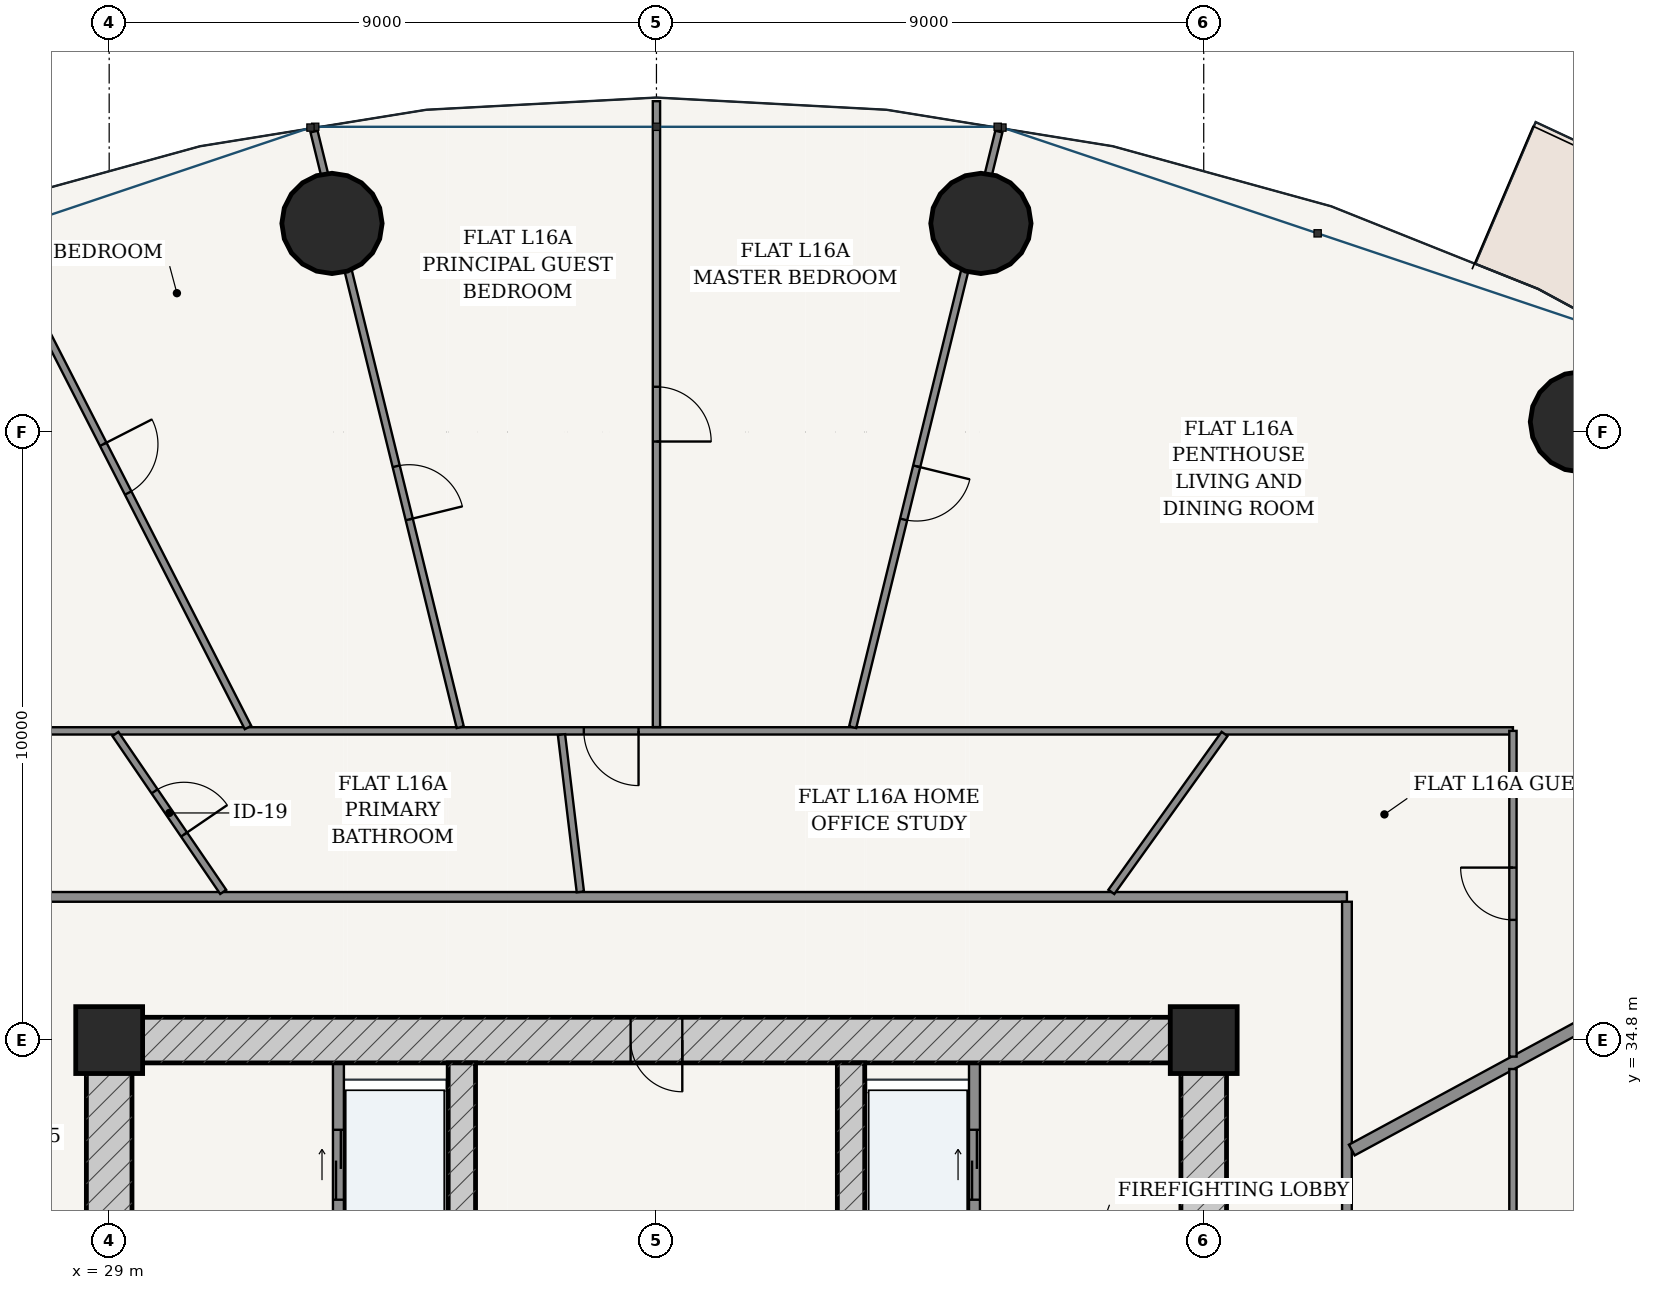
"""IFC4 building model, lengths in metres.
Left out: names, types, materials, properties, quantities, classifications, styles, units other than length and angle.
Written with IfcOpenShell. Run it as: python <this file> out.ifc"""

import sys

from ifc_helpers import new_model, si_unit, direction, frame, frame_2d, origin, origin_2d, place, context, subcontext, project, spatial, rectangle, hollow_circle, extrude, source, transform, mapped, element, fill, save


model = new_model("IFC4")
c1 = context("Model", 3, precision=1e-05, world=origin(), true_north=direction((-0.2419218956, 0.970295726276)))
c2 = subcontext(c1, "Body", "Model", "MODEL_VIEW")
j1 = project(units=[si_unit("LENGTHUNIT", "METRE"), si_unit("PLANEANGLEUNIT", "RADIAN")], contexts=[c1])
p1 = place(None, origin())
s1 = spatial("IfcSite", under=j1, at=p1, CompositionType="ELEMENT")
p2 = place(p1, origin())
s2 = spatial("IfcBuilding", under=s1, at=p2, CompositionType="ELEMENT")
p3 = place(p2, frame((0.0, 0.0, 63.6)))
s3 = spatial("IfcBuildingStorey", under=s2, at=p3, CompositionType="ELEMENT", Elevation=63.6)
for number, where, z_axis, x_axis in (
    (1, (47.0, 34.8, 0.0), (0.0, 0.0, 1.0), (1.0, 0.0, 0.0)),
    (2, (29.0, 34.8, 0.0), (0.0, 0.0, 1.0), (1.0, 0.0, 0.0)),
):
    element("IfcColumn", number, at=place(p3, frame(where, z_axis=z_axis, x_axis=x_axis)), inside=s3, PredefinedType="COLUMN", context=c2, shape_type="SweptSolid", body=[
        extrude(rectangle(XDim=1.1, YDim=1.1, at=origin_2d()), origin(), (0.0, 0.0, 1.0), 3.6),
    ])
p4 = place(p3, frame((28.625, 34.8, 0.0), z_axis=(0.0, 0.0, 1.0), x_axis=(1.0, 0.0, 0.0)))
e3 = element("IfcWall", 3, at=p4, inside=s3, PredefinedType="SHEAR", context=c2, shape_type="SweptSolid", body=[
    extrude(rectangle(XDim=18.75, YDim=0.75, at=frame_2d((9.375, 0.0))), origin(), (0.0, 0.0, 1.0), 3.32),
])
p5 = place(p4, frame((8.95, 0.0, 0.0)))
e4 = element("IfcOpeningElement", 4, at=p5, cuts=e3, PredefinedType="OPENING", context=c2, shape_type="SweptSolid", body=[
    extrude(rectangle(XDim=0.85, YDim=2.1, at=frame_2d((0.425, 1.05))), frame((0.0, 0.385, 0.0), z_axis=(0.0, -1.0, 0.0), x_axis=(1.0, 0.0, 0.0)), (0.0, 0.0, 1.0), 0.77),
])
p6 = place(p3, frame((29.0, 19.175, 0.0), z_axis=(0.0, 0.0, 1.0), x_axis=(0.0, 1.0, 0.0)))
e5 = element("IfcWall", 5, at=p6, inside=s3, PredefinedType="SHEAR", context=c2, shape_type="SweptSolid", body=[
    extrude(rectangle(XDim=15.25, YDim=0.75, at=frame_2d((7.625, 0.0))), origin(), (0.0, 0.0, 1.0), 3.32),
])
p7 = place(p6, frame((9.875, 0.0, 0.0)))
e6 = element("IfcOpeningElement", 6, at=p7, cuts=e5, PredefinedType="OPENING", context=c2, shape_type="SweptSolid", body=[
    extrude(rectangle(XDim=1.5, YDim=2.2, at=frame_2d((0.75, 1.1))), frame((0.0, 0.385, 0.0), z_axis=(0.0, -1.0, 0.0), x_axis=(1.0, 0.0, 0.0)), (0.0, 0.0, 1.0), 0.77),
])
p8 = place(p3, frame((47.0, 19.175, 0.0), z_axis=(0.0, 0.0, 1.0), x_axis=(0.0, 1.0, 0.0)))
e7 = element("IfcWall", 7, at=p8, inside=s3, PredefinedType="SHEAR", context=c2, shape_type="SweptSolid", body=[
    extrude(rectangle(XDim=15.25, YDim=0.75, at=frame_2d((7.625, 0.0))), origin(), (0.0, 0.0, 1.0), 3.32),
])
p9 = place(p8, frame((9.875, 0.0, 0.0)))
e8 = element("IfcOpeningElement", 8, at=p9, cuts=e7, PredefinedType="OPENING", context=c2, shape_type="SweptSolid", body=[
    extrude(rectangle(XDim=1.5, YDim=2.2, at=frame_2d((0.75, 1.1))), frame((0.0, 0.385, 0.0), z_axis=(0.0, -1.0, 0.0), x_axis=(1.0, 0.0, 0.0)), (0.0, 0.0, 1.0), 0.77),
])
p10 = place(p3, frame((34.8, 19.175, 0.0), z_axis=(0.0, 0.0, 1.0), x_axis=(0.0, 1.0, 0.0)))
e9 = element("IfcWall", 9, at=p10, inside=s3, PredefinedType="SHEAR", context=c2, shape_type="SweptSolid", body=[
    extrude(rectangle(XDim=15.25, YDim=0.45, at=frame_2d((7.625, 0.0))), origin(), (0.0, 0.0, 1.0), 3.32),
])
p11 = place(p10, frame((7.8, 0.0, 0.0)))
e10 = element("IfcOpeningElement", 10, at=p11, cuts=e9, PredefinedType="OPENING", context=c2, shape_type="SweptSolid", body=[
    extrude(rectangle(XDim=1.05, YDim=2.15, at=frame_2d((0.525, 1.075))), frame((0.0, 0.235, 0.0), z_axis=(0.0, -1.0, 0.0), x_axis=(1.0, 0.0, 0.0)), (0.0, 0.0, 1.0), 0.47),
])
p12 = place(p3, frame((41.2, 19.175, 0.0), z_axis=(0.0, 0.0, 1.0), x_axis=(0.0, 1.0, 0.0)))
e11 = element("IfcWall", 11, at=p12, inside=s3, PredefinedType="SHEAR", context=c2, shape_type="SweptSolid", body=[
    extrude(rectangle(XDim=15.25, YDim=0.45, at=frame_2d((7.625, 0.0))), origin(), (0.0, 0.0, 1.0), 3.32),
])
p13 = place(p12, frame((7.8, 0.0, 0.0)))
e12 = element("IfcOpeningElement", 12, at=p13, cuts=e11, PredefinedType="OPENING", context=c2, shape_type="SweptSolid", body=[
    extrude(rectangle(XDim=1.05, YDim=2.15, at=frame_2d((0.525, 1.075))), frame((0.0, 0.235, 0.0), z_axis=(0.0, -1.0, 0.0), x_axis=(1.0, 0.0, 0.0)), (0.0, 0.0, 1.0), 0.47),
])
for number, where, z_axis, x_axis in (
    (13, (53.195, 44.968, 0.0), (0.0, 0.0, 1.0), (1.0, 0.0, 0.0)),
    (14, (43.336, 48.23, 0.0), (0.0, 0.0, 1.0), (1.0, 0.0, 0.0)),
    (15, (32.664, 48.23, 0.0), (0.0, 0.0, 1.0), (1.0, 0.0, 0.0)),
):
    element("IfcColumn", number, at=place(p3, frame(where, z_axis=z_axis, x_axis=x_axis)), inside=s3, PredefinedType="COLUMN", context=c2, shape_type="SweptSolid", body=[
        extrude(hollow_circle(Radius=0.825, WallThickness=0.05, at=origin_2d()), origin(), (0.0, 0.0, 1.0), 3.6),
    ])
p14 = place(p3, frame((32.77, 28.52, 0.0), z_axis=(0.0, 0.0, 1.0), x_axis=(0.0, 1.0, 0.0)))
e16 = element("IfcWall", 16, at=p14, inside=s3, PredefinedType="PARTITIONING", context=c2, shape_type="SweptSolid", body=[
    extrude(rectangle(XDim=5.905, YDim=0.18, at=frame_2d((2.953, 0.0))), origin(), (0.0, 0.0, 1.0), 3.32),
])
p15 = place(p14, frame((3.655, 0.0, 0.0)))
e17 = element("IfcOpeningElement", 17, at=p15, cuts=e16, PredefinedType="OPENING", context=c2, shape_type="SweptSolid", body=[
    extrude(rectangle(XDim=1.15, YDim=2.2, at=frame_2d((0.575, 1.1))), frame((0.0, 0.1, 0.0), z_axis=(0.0, -1.0, 0.0), x_axis=(1.0, 0.0, 0.0)), (0.0, 0.0, 1.0), 0.2),
])
p16 = place(p14, frame((0.73, 0.0, 0.0)))
e18 = element("IfcOpeningElement", 18, at=p16, cuts=e16, PredefinedType="OPENING", context=c2, shape_type="SweptSolid", body=[
    extrude(rectangle(XDim=1.2, YDim=2.25, at=frame_2d((0.6, 1.125))), frame((0.0, 0.1, 0.0), z_axis=(0.0, -1.0, 0.0), x_axis=(1.0, 0.0, 0.0)), (0.0, 0.0, 1.0), 0.2),
])
p17 = place(p3, frame((43.23, 28.52, 0.0), z_axis=(0.0, 0.0, 1.0), x_axis=(0.0, 1.0, 0.0)))
e19 = element("IfcWall", 19, at=p17, inside=s3, PredefinedType="PARTITIONING", context=c2, shape_type="SweptSolid", body=[
    extrude(rectangle(XDim=5.905, YDim=0.18, at=frame_2d((2.953, 0.0))), origin(), (0.0, 0.0, 1.0), 3.32),
])
p18 = place(p17, frame((0.905, 0.0, 0.0)))
e20 = element("IfcOpeningElement", 20, at=p18, cuts=e19, PredefinedType="OPENING", context=c2, shape_type="SweptSolid", body=[
    extrude(rectangle(XDim=0.85, YDim=2.1, at=frame_2d((0.425, 1.05))), frame((0.0, 0.1, 0.0), z_axis=(0.0, -1.0, 0.0), x_axis=(1.0, 0.0, 0.0)), (0.0, 0.0, 1.0), 0.2),
])
p19 = place(p17, frame((3.655, 0.0, 0.0)))
e21 = element("IfcOpeningElement", 21, at=p19, cuts=e19, PredefinedType="OPENING", context=c2, shape_type="SweptSolid", body=[
    extrude(rectangle(XDim=1.15, YDim=2.2, at=frame_2d((0.575, 1.1))), frame((0.0, 0.1, 0.0), z_axis=(0.0, -1.0, 0.0), x_axis=(1.0, 0.0, 0.0)), (0.0, 0.0, 1.0), 0.2),
])
p20 = place(p3, frame((26.645, 37.155, 0.0), z_axis=(0.0, 0.0, 1.0), x_axis=(1.0, 0.0, 0.0)))
e22 = element("IfcWall", 22, at=p20, inside=s3, PredefinedType="PARTITIONING", context=c2, shape_type="SweptSolid", body=[
    extrude(rectangle(XDim=22.71, YDim=0.16, at=frame_2d((11.355, 0.0))), origin(), (0.0, 0.0, 1.0), 2.688),
])
p21 = place(p3, frame((49.355, 16.525, 0.0), z_axis=(0.0, 0.0, 1.0), x_axis=(0.0, 1.0, 0.0)))
e23 = element("IfcWall", 23, at=p21, inside=s3, PredefinedType="PARTITIONING", context=c2, shape_type="SweptSolid", body=[
    extrude(rectangle(XDim=20.55, YDim=0.16, at=frame_2d((10.275, 0.0))), origin(), (0.0, 0.0, 1.0), 2.688),
])
p22 = place(p21, frame((2.733, 0.0, 0.0)))
e24 = element("IfcOpeningElement", 24, at=p22, cuts=e23, PredefinedType="OPENING", context=c2, shape_type="SweptSolid", body=[
    extrude(rectangle(XDim=0.98, YDim=2.2, at=frame_2d((0.49, 1.1))), frame((0.0, 0.09, 0.0), z_axis=(0.0, -1.0, 0.0), x_axis=(1.0, 0.0, 0.0)), (0.0, 0.0, 1.0), 0.18),
])
p23 = place(p3, frame((49.435, 32.991, 0.0), z_axis=(0.0, 0.0, 1.0), x_axis=(0.879369737803, 0.476139542819, 0.0)))
e25 = element("IfcWall", 25, at=p23, inside=s3, PredefinedType="PARTITIONING", context=c2, shape_type="SweptSolid", body=[
    extrude(rectangle(XDim=14.295, YDim=0.2, at=frame_2d((7.147, 0.0))), origin(), (0.0, 0.0, 1.0), 2.688),
])
p24 = place(p3, frame((23.915, 39.885, 0.0), z_axis=(0.0, 0.0, 1.0), x_axis=(1.0, 0.0, 0.0)))
e26 = element("IfcWall", 26, at=p24, inside=s3, PredefinedType="PARTITIONING", context=c2, shape_type="SweptSolid", body=[
    extrude(rectangle(XDim=28.17, YDim=0.12, at=frame_2d((14.085, 0.0))), origin(), (0.0, 0.0, 1.0), 2.688),
])
p25 = place(p24, frame((12.891, 0.0, 0.0)))
e27 = element("IfcOpeningElement", 27, at=p25, cuts=e26, PredefinedType="OPENING", context=c2, shape_type="SweptSolid", body=[
    extrude(rectangle(XDim=0.9, YDim=2.15, at=frame_2d((0.45, 1.075))), frame((0.0, 0.07, 0.0), z_axis=(0.0, -1.0, 0.0), x_axis=(1.0, 0.0, 0.0)), (0.0, 0.0, 1.0), 0.14),
])
p26 = place(p3, frame((52.085, 39.885, 0.0), z_axis=(0.0, 0.0, 1.0), x_axis=(0.0, -1.0, 0.0)))
e28 = element("IfcWall", 28, at=p26, inside=s3, PredefinedType="PARTITIONING", context=c2, shape_type="SweptSolid", body=[
    extrude(rectangle(XDim=5.357, YDim=0.12, at=frame_2d((2.678, 0.0))), origin(), (0.0, 0.0, 1.0), 2.999),
])
p27 = place(p26, frame((2.248, 0.0, 0.0)))
e29 = element("IfcOpeningElement", 29, at=p27, cuts=e28, PredefinedType="OPENING", context=c2, shape_type="SweptSolid", body=[
    extrude(rectangle(XDim=0.86, YDim=2.15, at=frame_2d((0.43, 1.075))), frame((0.0, 0.07, 0.0), z_axis=(0.0, -1.0, 0.0), x_axis=(1.0, 0.0, 0.0)), (0.0, 0.0, 1.0), 0.14),
])
p28 = place(p3, frame((41.227, 39.945, 0.0), z_axis=(0.0, 0.0, 1.0), x_axis=(0.238375747469, 0.97117300365, 0.0)))
e30 = element("IfcWall", 30, at=p28, inside=s3, PredefinedType="PARTITIONING", context=c2, shape_type="SweptSolid", body=[
    extrude(rectangle(XDim=10.086, YDim=0.12, at=frame_2d((5.043, 0.0))), origin(), (0.0, 0.0, 1.0), 2.688),
])
p29 = place(p28, frame((3.518, 0.0, 0.0)))
e31 = element("IfcOpeningElement", 31, at=p29, cuts=e30, PredefinedType="OPENING", context=c2, shape_type="SweptSolid", body=[
    extrude(rectangle(XDim=0.9, YDim=2.15, at=frame_2d((0.45, 1.075))), frame((0.0, 0.07, 0.0), z_axis=(0.0, -1.0, 0.0), x_axis=(1.0, 0.0, 0.0)), (0.0, 0.0, 1.0), 0.14),
])
p30 = place(p3, frame((38.0, 39.947, 0.0), z_axis=(0.0, 0.0, 1.0), x_axis=(0.0, 1.0, 0.0)))
e32 = element("IfcWall", 32, at=p30, inside=s3, PredefinedType="PARTITIONING", context=c2, shape_type="SweptSolid", body=[
    extrude(rectangle(XDim=10.293, YDim=0.12, at=frame_2d((5.146, 0.0))), origin(), (0.0, 0.0, 1.0), 2.762),
])
p31 = place(p30, frame((4.697, 0.0, 0.0)))
e33 = element("IfcOpeningElement", 33, at=p31, cuts=e32, PredefinedType="OPENING", context=c2, shape_type="SweptSolid", body=[
    extrude(rectangle(XDim=0.9, YDim=2.15, at=frame_2d((0.45, 1.075))), frame((0.0, 0.07, 0.0), z_axis=(0.0, -1.0, 0.0), x_axis=(1.0, 0.0, 0.0)), (0.0, 0.0, 1.0), 0.14),
])
p32 = place(p3, frame((34.773, 39.945, 0.0), z_axis=(0.0, 0.0, 1.0), x_axis=(-0.238375747469, 0.97117300365, 0.0)))
e34 = element("IfcWall", 34, at=p32, inside=s3, PredefinedType="PARTITIONING", context=c2, shape_type="SweptSolid", body=[
    extrude(rectangle(XDim=10.086, YDim=0.12, at=frame_2d((5.043, 0.0))), origin(), (0.0, 0.0, 1.0), 2.688),
])
p33 = place(p32, frame((3.519, 0.0, 0.0)))
e35 = element("IfcOpeningElement", 35, at=p33, cuts=e34, PredefinedType="OPENING", context=c2, shape_type="SweptSolid", body=[
    extrude(rectangle(XDim=0.9, YDim=2.15, at=frame_2d((0.45, 1.075))), frame((0.0, 0.07, 0.0), z_axis=(0.0, -1.0, 0.0), x_axis=(1.0, 0.0, 0.0)), (0.0, 0.0, 1.0), 0.14),
])
p34 = place(p3, frame((31.283, 39.94, 0.0), z_axis=(0.0, 0.0, 1.0), x_axis=(-0.455131303234, 0.890424335256, 0.0)))
e36 = element("IfcWall", 36, at=p34, inside=s3, PredefinedType="PARTITIONING", context=c2, shape_type="SweptSolid", body=[
    extrude(rectangle(XDim=9.562, YDim=0.12, at=frame_2d((4.781, 0.0))), origin(), (0.0, 0.0, 1.0), 2.762),
])
p35 = place(p34, frame((4.331, 0.0, 0.0)))
e37 = element("IfcOpeningElement", 37, at=p35, cuts=e36, PredefinedType="OPENING", context=c2, shape_type="SweptSolid", body=[
    extrude(rectangle(XDim=0.9, YDim=2.15, at=frame_2d((0.45, 1.075))), frame((0.0, 0.07, 0.0), z_axis=(0.0, -1.0, 0.0), x_axis=(1.0, 0.0, 0.0)), (0.0, 0.0, 1.0), 0.14),
])
p36 = place(p3, frame((45.481, 37.237, 0.0), z_axis=(0.0, 0.0, 1.0), x_axis=(0.582530715463, 0.812808689387, 0.0)))
e38 = element("IfcWall", 38, at=p36, inside=s3, PredefinedType="PARTITIONING", context=c2, shape_type="SweptSolid", body=[
    extrude(rectangle(XDim=3.197, YDim=0.12, at=frame_2d((1.598, 0.0))), origin(), (0.0, 0.0, 1.0), 3.32),
])
p37 = place(p3, frame((36.749, 37.237, 0.0), z_axis=(0.0, 0.0, 1.0), x_axis=(-0.119119351225, 0.992879942472, 0.0)))
e39 = element("IfcWall", 39, at=p37, inside=s3, PredefinedType="PARTITIONING", context=c2, shape_type="SweptSolid", body=[
    extrude(rectangle(XDim=2.605, YDim=0.12, at=frame_2d((1.302, 0.0))), origin(), (0.0, 0.0, 1.0), 3.32),
])
p38 = place(p3, frame((30.875, 37.237, 0.0), z_axis=(0.0, 0.0, 1.0), x_axis=(-0.563751131022, 0.825944708967, 0.0)))
e40 = element("IfcWall", 40, at=p38, inside=s3, PredefinedType="PARTITIONING", context=c2, shape_type="SweptSolid", body=[
    extrude(rectangle(XDim=3.145, YDim=0.12, at=frame_2d((1.572, 0.0))), origin(), (0.0, 0.0, 1.0), 3.32),
])
p39 = place(p38, frame((1.142, 0.0, 0.0)))
e41 = element("IfcOpeningElement", 41, at=p39, cuts=e40, PredefinedType="OPENING", context=c2, shape_type="SweptSolid", body=[
    extrude(rectangle(XDim=0.86, YDim=2.15, at=frame_2d((0.43, 1.075))), frame((0.0, 0.07, 0.0), z_axis=(0.0, -1.0, 0.0), x_axis=(1.0, 0.0, 0.0)), (0.0, 0.0, 1.0), 0.14),
])
p40 = place(p3, frame((52.085, 34.324, 0.0), z_axis=(0.0, 0.0, 1.0), x_axis=(0.0, -1.0, 0.0)))
e42 = element("IfcWall", 42, at=p40, inside=s3, PredefinedType="PARTITIONING", context=c2, shape_type="SweptSolid", body=[
    extrude(rectangle(XDim=20.609, YDim=0.12, at=frame_2d((10.305, 0.0))), origin(), (0.0, 0.0, 1.0), 2.688),
])
p41 = place(p40, frame((15.972, 0.0, 0.0)))
e43 = element("IfcOpeningElement", 43, at=p41, cuts=e42, PredefinedType="OPENING", context=c2, shape_type="SweptSolid", body=[
    extrude(rectangle(XDim=0.9, YDim=2.15, at=frame_2d((0.45, 1.075))), frame((0.0, 0.07, 0.0), z_axis=(0.0, -1.0, 0.0), x_axis=(1.0, 0.0, 0.0)), (0.0, 0.0, 1.0), 0.14),
])
p42 = place(p40, frame((3.058, 0.0, 0.0)))
e44 = element("IfcOpeningElement", 44, at=p42, cuts=e42, PredefinedType="OPENING", context=c2, shape_type="SweptSolid", body=[
    extrude(rectangle(XDim=0.9, YDim=2.15, at=frame_2d((0.45, 1.075))), frame((0.0, 0.07, 0.0), z_axis=(0.0, -1.0, 0.0), x_axis=(1.0, 0.0, 0.0)), (0.0, 0.0, 1.0), 0.14),
])
m1 = source(origin(), c2, "Body", "SweptSolid", [
    extrude(rectangle(XDim=0.85, YDim=2.1, at=frame_2d((0.425, 1.05))), frame((0.0, 0.025, 0.0), z_axis=(0.0, -1.0, 0.0), x_axis=(1.0, 0.0, 0.0)), (0.0, 0.0, 1.0), 0.05),
])
p43 = place(p5, frame((0.85, 0.0, 0.0), z_axis=(0.0, 0.0, 1.0), x_axis=(-1.0, 0.0, 0.0)))
e45 = element("IfcDoor", 45, at=p43, inside=s3, OperationType="SINGLE_SWING_LEFT", PredefinedType="DOOR", context=c2, shape_type="MappedRepresentation", body=[
    mapped(m1, transform((0.0, 0.0, 0.0), scale=1.0)),
])
fill(e4, e45)
m2 = source(origin(), c2, "Body", "SweptSolid", [
    extrude(rectangle(XDim=1.15, YDim=2.2, at=frame_2d((0.575, 1.1))), frame((0.0, 0.025, 0.0), z_axis=(0.0, -1.0, 0.0), x_axis=(1.0, 0.0, 0.0)), (0.0, 0.0, 1.0), 0.05),
])
p44 = place(p15, origin())
e46 = element("IfcDoor", 46, at=p44, inside=s3, OperationType="DOUBLE_DOOR_SLIDING", PredefinedType="DOOR", context=c2, shape_type="MappedRepresentation", body=[
    mapped(m2, transform((0.0, 0.0, 0.0), scale=1.0)),
])
fill(e17, e46)
p45 = place(p19, origin())
e47 = element("IfcDoor", 47, at=p45, inside=s3, OperationType="DOUBLE_DOOR_SLIDING", PredefinedType="DOOR", context=c2, shape_type="MappedRepresentation", body=[
    mapped(m2, transform((0.0, 0.0, 0.0), scale=1.0)),
])
fill(e21, e47)
m3 = source(origin(), c2, "Body", "SweptSolid", [
    extrude(rectangle(XDim=0.86, YDim=2.15, at=frame_2d((0.43, 1.075))), frame((0.0, 0.025, 0.0), z_axis=(0.0, -1.0, 0.0), x_axis=(1.0, 0.0, 0.0)), (0.0, 0.0, 1.0), 0.05),
])
p46 = place(p39, frame((0.86, 0.0, 0.0), z_axis=(0.0, 0.0, 1.0), x_axis=(-1.0, 0.0, 0.0)))
e48 = element("IfcDoor", 48, at=p46, inside=s3, OperationType="SINGLE_SWING_RIGHT", PredefinedType="DOOR", context=c2, shape_type="MappedRepresentation", body=[
    mapped(m3, transform((0.0, 0.0, 0.0), scale=1.0)),
])
fill(e41, e48)
m4 = source(origin(), c2, "Body", "SweptSolid", [
    extrude(rectangle(XDim=0.9, YDim=2.15, at=frame_2d((0.45, 1.075))), frame((0.0, 0.025, 0.0), z_axis=(0.0, -1.0, 0.0), x_axis=(1.0, 0.0, 0.0)), (0.0, 0.0, 1.0), 0.05),
])
p47 = place(p35, frame((0.9, 0.0, 0.0), z_axis=(0.0, 0.0, 1.0), x_axis=(-1.0, 0.0, 0.0)))
e49 = element("IfcDoor", 49, at=p47, inside=s3, OperationType="SINGLE_SWING_LEFT", PredefinedType="DOOR", context=c2, shape_type="MappedRepresentation", body=[
    mapped(m4, transform((0.0, 0.0, 0.0), scale=1.0)),
])
fill(e37, e49)
p48 = place(p33, frame((0.9, 0.0, 0.0), z_axis=(0.0, 0.0, 1.0), x_axis=(-1.0, 0.0, 0.0)))
e50 = element("IfcDoor", 50, at=p48, inside=s3, OperationType="SINGLE_SWING_RIGHT", PredefinedType="DOOR", context=c2, shape_type="MappedRepresentation", body=[
    mapped(m4, transform((0.0, 0.0, 0.0), scale=1.0)),
])
fill(e35, e50)
p49 = place(p25, frame((0.9, 0.0, 0.0), z_axis=(0.0, 0.0, 1.0), x_axis=(-1.0, 0.0, 0.0)))
e51 = element("IfcDoor", 51, at=p49, inside=s3, OperationType="SINGLE_SWING_LEFT", PredefinedType="DOOR", context=c2, shape_type="MappedRepresentation", body=[
    mapped(m4, transform((0.0, 0.0, 0.0), scale=1.0)),
])
fill(e27, e51)
p50 = place(p31, frame((0.9, 0.0, 0.0), z_axis=(0.0, 0.0, 1.0), x_axis=(-1.0, 0.0, 0.0)))
e52 = element("IfcDoor", 52, at=p50, inside=s3, OperationType="SINGLE_SWING_RIGHT", PredefinedType="DOOR", context=c2, shape_type="MappedRepresentation", body=[
    mapped(m4, transform((0.0, 0.0, 0.0), scale=1.0)),
])
fill(e33, e52)
p51 = place(p29, frame((0.9, 0.0, 0.0), z_axis=(0.0, 0.0, 1.0), x_axis=(-1.0, 0.0, 0.0)))
e53 = element("IfcDoor", 53, at=p51, inside=s3, OperationType="SINGLE_SWING_LEFT", PredefinedType="DOOR", context=c2, shape_type="MappedRepresentation", body=[
    mapped(m4, transform((0.0, 0.0, 0.0), scale=1.0)),
])
fill(e31, e53)
p52 = place(p27, frame((0.86, 0.0, 0.0), z_axis=(0.0, 0.0, 1.0), x_axis=(-1.0, 0.0, 0.0)))
e54 = element("IfcDoor", 54, at=p52, inside=s3, OperationType="SINGLE_SWING_RIGHT", PredefinedType="DOOR", context=c2, shape_type="MappedRepresentation", body=[
    mapped(m3, transform((0.0, 0.0, 0.0), scale=1.0)),
])
fill(e29, e54)
save(model, sys.argv[1])
